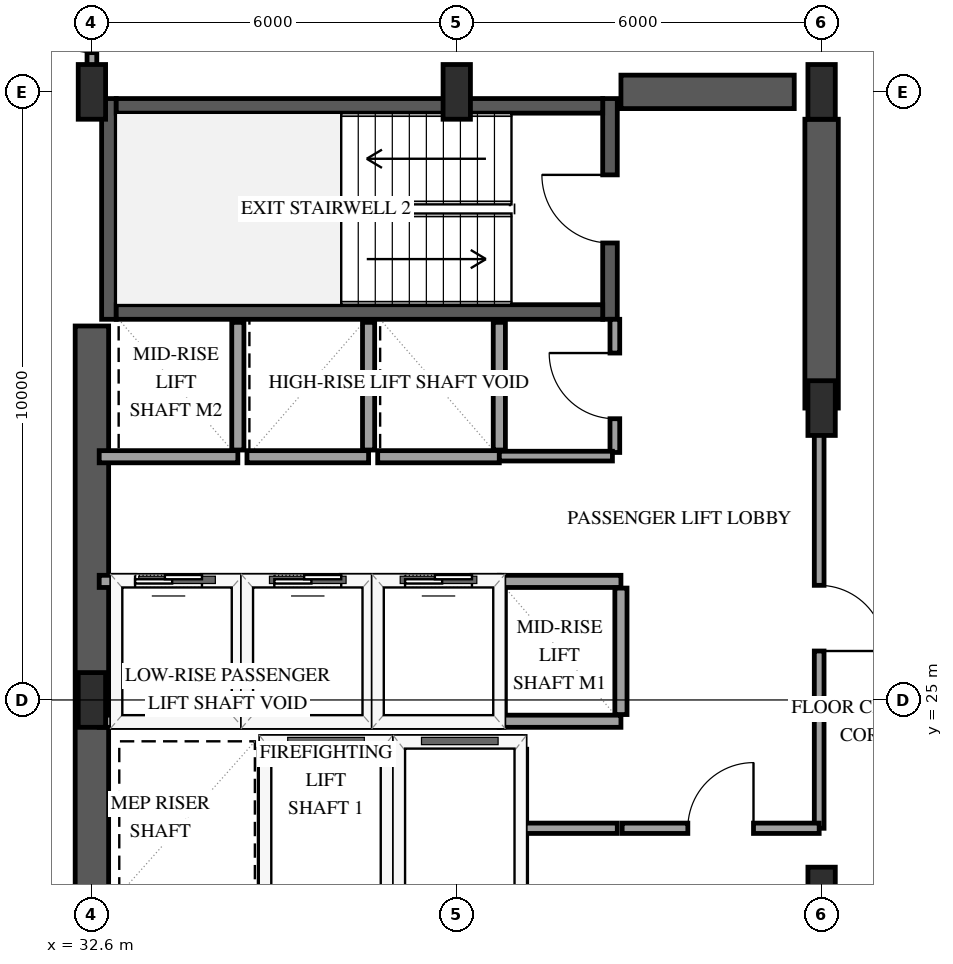
"""IFC4 building model, lengths in metres.
Left out: names, types, materials, properties, quantities, classifications, styles, units other than length and angle.
Written with IfcOpenShell. Run it as: python <this file> out.ifc"""

import sys

from ifc_helpers import new_model, si_unit, direction, frame, frame_2d, origin, origin_2d, place, context, subcontext, project, spatial, rectangle, extrude, element, fill, save


model = new_model("IFC4")
c1 = context("Model", 3, precision=1e-05, world=origin(), true_north=direction((0.0, 1.0)))
c2 = subcontext(c1, "Body", "Model", "MODEL_VIEW")
j1 = project(units=[si_unit("LENGTHUNIT", "METRE"), si_unit("PLANEANGLEUNIT", "RADIAN")], contexts=[c1])
p1 = place(None, origin())
s1 = spatial("IfcSite", under=j1, at=p1, CompositionType="ELEMENT")
p2 = place(p1, origin())
s2 = spatial("IfcBuilding", under=s1, at=p2, CompositionType="ELEMENT")
p3 = place(p2, frame((0.0, 0.0, 114.7)))
s3 = spatial("IfcBuildingStorey", under=s2, at=p3, CompositionType="ELEMENT", Elevation=114.7)
p4 = place(p3, frame((32.88, 31.26, 0.0), z_axis=(0.0, 0.0, 1.0), x_axis=(0.0, 1.0, 0.0)))
e1 = element("IfcWall", 1, at=p4, inside=s3, PredefinedType="SHEAR", context=c2, shape_type="SweptSolid", body=[
    extrude(rectangle(XDim=3.63, YDim=0.24, at=frame_2d((1.815, 0.0))), origin(), (0.0, 0.0, 1.0), 3.9),
])
p5 = place(p3, frame((41.12, 31.26, 0.0), z_axis=(0.0, 0.0, 1.0), x_axis=(0.0, 1.0, 0.0)))
e2 = element("IfcWall", 2, at=p5, inside=s3, PredefinedType="SHEAR", context=c2, shape_type="SweptSolid", body=[
    extrude(rectangle(XDim=3.63, YDim=0.24, at=frame_2d((1.815, 0.0))), origin(), (0.0, 0.0, 1.0), 3.9),
])
p6 = place(p5, frame((1.255, 0.0, 0.0)))
e3 = element("IfcOpeningElement", 3, at=p6, cuts=e2, PredefinedType="OPENING", context=c2, shape_type="SweptSolid", body=[
    extrude(rectangle(XDim=1.12, YDim=2.15, at=frame_2d((0.56, 1.075))), frame((0.0, 0.13, 0.0), z_axis=(0.0, -1.0, 0.0), x_axis=(1.0, 0.0, 0.0)), (0.0, 0.0, 1.0), 0.26),
])
for number, where, z_axis, x_axis in (
    (4, (33.0, 31.38, 0.0), (0.0, 0.0, 1.0), (1.0, 0.0, 0.0)),
    (5, (33.0, 34.77, 0.0), (0.0, 0.0, 1.0), (1.0, 0.0, 0.0)),
):
    element("IfcWall", number, at=place(p3, frame(where, z_axis=z_axis, x_axis=x_axis)), inside=s3, PredefinedType="SHEAR", context=c2, shape_type="SweptSolid", body=[
        extrude(rectangle(XDim=8.0, YDim=0.24, at=frame_2d((4.0, 0.0))), origin(), (0.0, 0.0, 1.0), 3.9),
    ])
p7 = place(p3, frame((32.6, 18.85, 0.0), z_axis=(0.0, 0.0, 1.0), x_axis=(0.0, 1.0, 0.0)))
e6 = element("IfcWall", 6, at=p7, inside=s3, PredefinedType="SHEAR", context=c2, shape_type="SweptSolid", body=[
    extrude(rectangle(XDim=12.3, YDim=0.55, at=frame_2d((6.15, 0.0))), origin(), (0.0, 0.0, 1.0), 3.9),
])
p8 = place(p3, frame((41.3, 35.0, 0.0), z_axis=(0.0, 0.0, 1.0), x_axis=(1.0, 0.0, 0.0)))
e7 = element("IfcWall", 7, at=p8, inside=s3, PredefinedType="SHEAR", context=c2, shape_type="SweptSolid", body=[
    extrude(rectangle(XDim=2.85, YDim=0.55, at=frame_2d((1.425, 0.0))), origin(), (0.0, 0.0, 1.0), 3.9),
])
p9 = place(p3, frame((44.6, 29.8, 0.0), z_axis=(0.0, 0.0, 1.0), x_axis=(0.0, 1.0, 0.0)))
e8 = element("IfcWall", 8, at=p9, inside=s3, PredefinedType="SHEAR", context=c2, shape_type="SweptSolid", body=[
    extrude(rectangle(XDim=4.75, YDim=0.55, at=frame_2d((2.375, 0.0))), origin(), (0.0, 0.0, 1.0), 3.9),
])
for number, where, z_axis, x_axis in (
    (9, (32.6, 25.0, 0.0), (0.0, 0.0, 1.0), (1.0, 0.0, 0.0)),
    (10, (32.6, 35.0, 0.0), (0.0, 0.0, 1.0), (1.0, 0.0, 0.0)),
    (11, (38.6, 35.0, 0.0), (0.0, 0.0, 1.0), (1.0, 0.0, 0.0)),
    (12, (44.6, 21.8, 0.0), (0.0, 0.0, 1.0), (1.0, 0.0, 0.0)),
    (13, (44.6, 29.8, 0.0), (0.0, 0.0, 1.0), (1.0, 0.0, 0.0)),
    (14, (44.6, 35.0, 0.0), (0.0, 0.0, 1.0), (1.0, 0.0, 0.0)),
):
    element("IfcColumn", number, at=place(p3, frame(where, z_axis=z_axis, x_axis=x_axis)), inside=s3, PredefinedType="PILASTER", context=c2, shape_type="SweptSolid", body=[
        extrude(rectangle(XDim=0.45, YDim=0.9, at=origin_2d()), origin(), (0.0, 0.0, 1.0), 3.9),
    ])
p10 = place(p3, frame((35.45, 24.3, 0.0), z_axis=(0.0, 0.0, 1.0), x_axis=(1.0, 0.0, 0.0)))
e15 = element("IfcWall", 15, at=p10, inside=s3, PredefinedType="SOLIDWALL", context=c2, shape_type="SweptSolid", body=[
    extrude(rectangle(XDim=2.0, YDim=0.2, at=frame_2d((1.0, 0.0))), origin(), (0.0, 0.0, 1.0), 3.6),
])
for number, where, z_axis, x_axis in (
    (16, (35.45, 21.81, 0.0), (0.0, 0.0, 1.0), (0.0, 1.0, 0.0)),
    (17, (37.45, 21.81, 0.0), (0.0, 0.0, 1.0), (0.0, 1.0, 0.0)),
):
    element("IfcWall", number, at=place(p3, frame(where, z_axis=z_axis, x_axis=x_axis)), inside=s3, PredefinedType="SOLIDWALL", context=c2, shape_type="SweptSolid", body=[
        extrude(rectangle(XDim=2.38, YDim=0.2, at=frame_2d((1.19, 0.0))), origin(), (0.0, 0.0, 1.0), 3.6),
    ])
p11 = place(p3, frame((37.65, 24.3, 0.0), z_axis=(0.0, 0.0, 1.0), x_axis=(1.0, 0.0, 0.0)))
e18 = element("IfcWall", 18, at=p11, inside=s3, PredefinedType="SOLIDWALL", context=c2, shape_type="SweptSolid", body=[
    extrude(rectangle(XDim=2.0, YDim=0.2, at=frame_2d((1.0, 0.0))), origin(), (0.0, 0.0, 1.0), 3.6),
])
p12 = place(p3, frame((39.65, 21.81, 0.0), z_axis=(0.0, 0.0, 1.0), x_axis=(0.0, 1.0, 0.0)))
e19 = element("IfcWall", 19, at=p12, inside=s3, PredefinedType="SOLIDWALL", context=c2, shape_type="SweptSolid", body=[
    extrude(rectangle(XDim=2.38, YDim=0.2, at=frame_2d((1.19, 0.0))), origin(), (0.0, 0.0, 1.0), 3.6),
])
p13 = place(p3, frame((32.72, 24.65, 0.0), z_axis=(0.0, 0.0, 1.0), x_axis=(1.0, 0.0, 0.0)))
e20 = element("IfcWall", 20, at=p13, inside=s3, PredefinedType="SOLIDWALL", context=c2, shape_type="SweptSolid", body=[
    extrude(rectangle(XDim=2.28, YDim=0.2, at=frame_2d((1.14, 0.0))), origin(), (0.0, 0.0, 1.0), 3.6),
])
p14 = place(p3, frame((32.72, 26.95, 0.0), z_axis=(0.0, 0.0, 1.0), x_axis=(1.0, 0.0, 0.0)))
e21 = element("IfcWall", 21, at=p14, inside=s3, PredefinedType="SOLIDWALL", context=c2, shape_type="SweptSolid", body=[
    extrude(rectangle(XDim=2.28, YDim=0.2, at=frame_2d((1.14, 0.0))), origin(), (0.0, 0.0, 1.0), 3.6),
])
p15 = place(p14, frame((0.59, 0.0, 0.0)))
e22 = element("IfcOpeningElement", 22, at=p15, cuts=e21, PredefinedType="OPENING", context=c2, shape_type="SweptSolid", body=[
    extrude(rectangle(XDim=1.1, YDim=2.15, at=frame_2d((0.55, 1.075))), frame((0.0, 0.11, 0.0), z_axis=(0.0, -1.0, 0.0), x_axis=(1.0, 0.0, 0.0)), (0.0, 0.0, 1.0), 0.22),
])
p16 = place(p3, frame((35.0, 24.76, 0.0), z_axis=(0.0, 0.0, 1.0), x_axis=(0.0, 1.0, 0.0)))
e23 = element("IfcWall", 23, at=p16, inside=s3, PredefinedType="SOLIDWALL", context=c2, shape_type="SweptSolid", body=[
    extrude(rectangle(XDim=2.08, YDim=0.2, at=frame_2d((1.04, 0.0))), origin(), (0.0, 0.0, 1.0), 3.6),
])
p17 = place(p3, frame((35.15, 24.65, 0.0), z_axis=(0.0, 0.0, 1.0), x_axis=(1.0, 0.0, 0.0)))
e24 = element("IfcWall", 24, at=p17, inside=s3, PredefinedType="SOLIDWALL", context=c2, shape_type="SweptSolid", body=[
    extrude(rectangle(XDim=2.0, YDim=0.2, at=frame_2d((1.0, 0.0))), origin(), (0.0, 0.0, 1.0), 3.6),
])
p18 = place(p3, frame((35.15, 26.95, 0.0), z_axis=(0.0, 0.0, 1.0), x_axis=(1.0, 0.0, 0.0)))
e25 = element("IfcWall", 25, at=p18, inside=s3, PredefinedType="SOLIDWALL", context=c2, shape_type="SweptSolid", body=[
    extrude(rectangle(XDim=2.0, YDim=0.2, at=frame_2d((1.0, 0.0))), origin(), (0.0, 0.0, 1.0), 3.6),
])
p19 = place(p18, frame((0.45, 0.0, 0.0)))
e26 = element("IfcOpeningElement", 26, at=p19, cuts=e25, PredefinedType="OPENING", context=c2, shape_type="SweptSolid", body=[
    extrude(rectangle(XDim=1.1, YDim=2.15, at=frame_2d((0.55, 1.075))), frame((0.0, 0.11, 0.0), z_axis=(0.0, -1.0, 0.0), x_axis=(1.0, 0.0, 0.0)), (0.0, 0.0, 1.0), 0.22),
])
p20 = place(p3, frame((37.15, 24.76, 0.0), z_axis=(0.0, 0.0, 1.0), x_axis=(0.0, 1.0, 0.0)))
e27 = element("IfcWall", 27, at=p20, inside=s3, PredefinedType="SOLIDWALL", context=c2, shape_type="SweptSolid", body=[
    extrude(rectangle(XDim=2.08, YDim=0.2, at=frame_2d((1.04, 0.0))), origin(), (0.0, 0.0, 1.0), 3.6),
])
p21 = place(p3, frame((37.3, 24.65, 0.0), z_axis=(0.0, 0.0, 1.0), x_axis=(1.0, 0.0, 0.0)))
e28 = element("IfcWall", 28, at=p21, inside=s3, PredefinedType="SOLIDWALL", context=c2, shape_type="SweptSolid", body=[
    extrude(rectangle(XDim=2.0, YDim=0.2, at=frame_2d((1.0, 0.0))), origin(), (0.0, 0.0, 1.0), 3.6),
])
p22 = place(p3, frame((37.3, 26.95, 0.0), z_axis=(0.0, 0.0, 1.0), x_axis=(1.0, 0.0, 0.0)))
e29 = element("IfcWall", 29, at=p22, inside=s3, PredefinedType="SOLIDWALL", context=c2, shape_type="SweptSolid", body=[
    extrude(rectangle(XDim=2.0, YDim=0.2, at=frame_2d((1.0, 0.0))), origin(), (0.0, 0.0, 1.0), 3.6),
])
p23 = place(p22, frame((0.45, 0.0, 0.0)))
e30 = element("IfcOpeningElement", 30, at=p23, cuts=e29, PredefinedType="OPENING", context=c2, shape_type="SweptSolid", body=[
    extrude(rectangle(XDim=1.1, YDim=2.15, at=frame_2d((0.55, 1.075))), frame((0.0, 0.11, 0.0), z_axis=(0.0, -1.0, 0.0), x_axis=(1.0, 0.0, 0.0)), (0.0, 0.0, 1.0), 0.22),
])
p24 = place(p3, frame((39.3, 24.76, 0.0), z_axis=(0.0, 0.0, 1.0), x_axis=(0.0, 1.0, 0.0)))
e31 = element("IfcWall", 31, at=p24, inside=s3, PredefinedType="SOLIDWALL", context=c2, shape_type="SweptSolid", body=[
    extrude(rectangle(XDim=2.08, YDim=0.2, at=frame_2d((1.04, 0.0))), origin(), (0.0, 0.0, 1.0), 3.6),
])
for number, where, z_axis, x_axis in (
    (32, (39.3, 24.65, 0.0), (0.0, 0.0, 1.0), (1.0, 0.0, 0.0)),
    (33, (39.3, 26.95, 0.0), (0.0, 0.0, 1.0), (1.0, 0.0, 0.0)),
):
    element("IfcWall", number, at=place(p3, frame(where, z_axis=z_axis, x_axis=x_axis)), inside=s3, PredefinedType="SOLIDWALL", context=c2, shape_type="SweptSolid", body=[
        extrude(rectangle(XDim=2.0, YDim=0.2, at=frame_2d((1.0, 0.0))), origin(), (0.0, 0.0, 1.0), 3.6),
    ])
p25 = place(p3, frame((41.3, 24.76, 0.0), z_axis=(0.0, 0.0, 1.0), x_axis=(0.0, 1.0, 0.0)))
e34 = element("IfcWall", 34, at=p25, inside=s3, PredefinedType="SOLIDWALL", context=c2, shape_type="SweptSolid", body=[
    extrude(rectangle(XDim=2.08, YDim=0.2, at=frame_2d((1.04, 0.0))), origin(), (0.0, 0.0, 1.0), 3.6),
])
p26 = place(p3, frame((32.72, 29.0, 0.0), z_axis=(0.0, 0.0, 1.0), x_axis=(1.0, 0.0, 0.0)))
e35 = element("IfcWall", 35, at=p26, inside=s3, PredefinedType="SOLIDWALL", context=c2, shape_type="SweptSolid", body=[
    extrude(rectangle(XDim=2.28, YDim=0.2, at=frame_2d((1.14, 0.0))), origin(), (0.0, 0.0, 1.0), 3.6),
])
p27 = place(p3, frame((35.0, 29.11, 0.0), z_axis=(0.0, 0.0, 1.0), x_axis=(0.0, 1.0, 0.0)))
e36 = element("IfcWall", 36, at=p27, inside=s3, PredefinedType="SOLIDWALL", context=c2, shape_type="SweptSolid", body=[
    extrude(rectangle(XDim=2.1, YDim=0.2, at=frame_2d((1.05, 0.0))), origin(), (0.0, 0.0, 1.0), 3.6),
])
p28 = place(p3, frame((35.15, 29.0, 0.0), z_axis=(0.0, 0.0, 1.0), x_axis=(1.0, 0.0, 0.0)))
e37 = element("IfcWall", 37, at=p28, inside=s3, PredefinedType="SOLIDWALL", context=c2, shape_type="SweptSolid", body=[
    extrude(rectangle(XDim=2.0, YDim=0.2, at=frame_2d((1.0, 0.0))), origin(), (0.0, 0.0, 1.0), 3.6),
])
p29 = place(p3, frame((37.15, 29.11, 0.0), z_axis=(0.0, 0.0, 1.0), x_axis=(0.0, 1.0, 0.0)))
e38 = element("IfcWall", 38, at=p29, inside=s3, PredefinedType="SOLIDWALL", context=c2, shape_type="SweptSolid", body=[
    extrude(rectangle(XDim=2.1, YDim=0.2, at=frame_2d((1.05, 0.0))), origin(), (0.0, 0.0, 1.0), 3.6),
])
p30 = place(p3, frame((37.3, 29.0, 0.0), z_axis=(0.0, 0.0, 1.0), x_axis=(1.0, 0.0, 0.0)))
e39 = element("IfcWall", 39, at=p30, inside=s3, PredefinedType="SOLIDWALL", context=c2, shape_type="SweptSolid", body=[
    extrude(rectangle(XDim=2.0, YDim=0.2, at=frame_2d((1.0, 0.0))), origin(), (0.0, 0.0, 1.0), 3.6),
])
p31 = place(p3, frame((39.3, 29.11, 0.0), z_axis=(0.0, 0.0, 1.0), x_axis=(0.0, 1.0, 0.0)))
e40 = element("IfcWall", 40, at=p31, inside=s3, PredefinedType="SOLIDWALL", context=c2, shape_type="SweptSolid", body=[
    extrude(rectangle(XDim=2.1, YDim=0.2, at=frame_2d((1.05, 0.0))), origin(), (0.0, 0.0, 1.0), 3.6),
])
p32 = place(p3, frame((44.56, 29.8, 0.0), z_axis=(0.0, 0.0, 1.0), x_axis=(0.0, -1.0, 0.0)))
e41 = element("IfcWall", 41, at=p32, inside=s3, PredefinedType="PARTITIONING", context=c2, shape_type="SweptSolid", body=[
    extrude(rectangle(XDim=6.91, YDim=0.16, at=frame_2d((3.455, 0.0))), origin(), (0.0, 0.0, 1.0), 2.64),
])
p33 = place(p32, frame((2.915, 0.0, 0.0)))
e42 = element("IfcOpeningElement", 42, at=p33, cuts=e41, PredefinedType="OPENING", context=c2, shape_type="SweptSolid", body=[
    extrude(rectangle(XDim=1.08, YDim=2.15, at=frame_2d((0.54, 1.075))), frame((0.0, 0.09, 0.0), z_axis=(0.0, -1.0, 0.0), x_axis=(1.0, 0.0, 0.0)), (0.0, 0.0, 1.0), 0.18),
])
p34 = place(p3, frame((41.32, 22.89, 0.0), z_axis=(0.0, 0.0, 1.0), x_axis=(1.0, 0.0, 0.0)))
e43 = element("IfcWall", 43, at=p34, inside=s3, PredefinedType="PARTITIONING", context=c2, shape_type="SweptSolid", body=[
    extrude(rectangle(XDim=3.24, YDim=0.17, at=frame_2d((1.62, 0.0))), origin(), (0.0, 0.0, 1.0), 3.6),
])
p35 = place(p34, frame((1.08, 0.0, 0.0)))
e44 = element("IfcOpeningElement", 44, at=p35, cuts=e43, PredefinedType="OPENING", context=c2, shape_type="SweptSolid", body=[
    extrude(rectangle(XDim=1.08, YDim=2.15, at=frame_2d((0.54, 1.075))), frame((0.0, 0.095, 0.0), z_axis=(0.0, -1.0, 0.0), x_axis=(1.0, 0.0, 0.0)), (0.0, 0.0, 1.0), 0.19),
])
p36 = place(p3, frame((41.2, 29.07, 0.0), z_axis=(0.0, 0.0, 1.0), x_axis=(0.0, 1.0, 0.0)))
e45 = element("IfcWall", 45, at=p36, inside=s3, PredefinedType="PARTITIONING", context=c2, shape_type="SweptSolid", body=[
    extrude(rectangle(XDim=2.19, YDim=0.16, at=frame_2d((1.095, 0.0))), origin(), (0.0, 0.0, 1.0), 3.6),
])
p37 = place(p36, frame((0.555, 0.0, 0.0)))
e46 = element("IfcOpeningElement", 46, at=p37, cuts=e45, PredefinedType="OPENING", context=c2, shape_type="SweptSolid", body=[
    extrude(rectangle(XDim=1.08, YDim=2.15, at=frame_2d((0.54, 1.075))), frame((0.0, 0.09, 0.0), z_axis=(0.0, -1.0, 0.0), x_axis=(1.0, 0.0, 0.0)), (0.0, 0.0, 1.0), 0.18),
])
p38 = place(p3, frame((32.6, 35.07, 0.0), z_axis=(0.0, 0.0, 1.0), x_axis=(0.0, 1.0, 0.0)))
e47 = element("IfcWall", 47, at=p38, inside=s3, PredefinedType="PARTITIONING", context=c2, shape_type="SweptSolid", body=[
    extrude(rectangle(XDim=1.91, YDim=0.16, at=frame_2d((0.955, 0.0))), origin(), (0.0, 0.0, 1.0), 3.6),
])
p39 = place(p38, frame((0.575, 0.0, 0.0)))
e48 = element("IfcOpeningElement", 48, at=p39, cuts=e47, PredefinedType="OPENING", context=c2, shape_type="SweptSolid", body=[
    extrude(rectangle(XDim=0.95, YDim=2.15, at=frame_2d((0.475, 1.075))), frame((0.0, 0.09, 0.0), z_axis=(0.0, -1.0, 0.0), x_axis=(1.0, 0.0, 0.0)), (0.0, 0.0, 1.0), 0.18),
])
p40 = place(p3, frame((39.3, 29.01, 0.0), z_axis=(0.0, 0.0, 1.0), x_axis=(1.0, 0.0, 0.0)))
e49 = element("IfcWall", 49, at=p40, inside=s3, PredefinedType="PARTITIONING", context=c2, shape_type="SweptSolid", body=[
    extrude(rectangle(XDim=1.86, YDim=0.16, at=frame_2d((0.93, 0.0))), origin(), (0.0, 0.0, 1.0), 3.6),
])
p41 = place(p3, frame((39.72, 22.89, 0.0), z_axis=(0.0, 0.0, 1.0), x_axis=(1.0, 0.0, 0.0)))
e50 = element("IfcWall", 50, at=p41, inside=s3, PredefinedType="PARTITIONING", context=c2, shape_type="SweptSolid", body=[
    extrude(rectangle(XDim=1.52, YDim=0.17, at=frame_2d((0.76, 0.0))), origin(), (0.0, 0.0, 1.0), 3.6),
])
p42 = place(p15, origin())
e51 = element("IfcDoor", 51, at=p42, inside=s3, OperationType="SLIDING_TO_LEFT", PredefinedType="DOOR", context=c2, shape_type="SweptSolid", body=[
    extrude(rectangle(XDim=1.1, YDim=2.15, at=frame_2d((0.55, 1.075))), frame((0.0, 0.025, 0.0), z_axis=(0.0, -1.0, 0.0), x_axis=(1.0, 0.0, 0.0)), (0.0, 0.0, 1.0), 0.05),
])
fill(e22, e51)
p43 = place(p19, origin())
e52 = element("IfcDoor", 52, at=p43, inside=s3, OperationType="SLIDING_TO_LEFT", PredefinedType="DOOR", context=c2, shape_type="SweptSolid", body=[
    extrude(rectangle(XDim=1.1, YDim=2.15, at=frame_2d((0.55, 1.075))), frame((0.0, 0.025, 0.0), z_axis=(0.0, -1.0, 0.0), x_axis=(1.0, 0.0, 0.0)), (0.0, 0.0, 1.0), 0.05),
])
fill(e26, e52)
p44 = place(p23, origin())
e53 = element("IfcDoor", 53, at=p44, inside=s3, OperationType="SLIDING_TO_LEFT", PredefinedType="DOOR", context=c2, shape_type="SweptSolid", body=[
    extrude(rectangle(XDim=1.1, YDim=2.15, at=frame_2d((0.55, 1.075))), frame((0.0, 0.025, 0.0), z_axis=(0.0, -1.0, 0.0), x_axis=(1.0, 0.0, 0.0)), (0.0, 0.0, 1.0), 0.05),
])
fill(e30, e53)
p45 = place(p6, origin())
e54 = element("IfcDoor", 54, at=p45, inside=s3, OperationType="SINGLE_SWING_RIGHT", PredefinedType="DOOR", context=c2, shape_type="SweptSolid", body=[
    extrude(rectangle(XDim=1.12, YDim=2.15, at=frame_2d((0.56, 1.075))), frame((0.0, 0.025, 0.0), z_axis=(0.0, -1.0, 0.0), x_axis=(1.0, 0.0, 0.0)), (0.0, 0.0, 1.0), 0.05),
])
fill(e3, e54)
p46 = place(p33, origin())
e55 = element("IfcDoor", 55, at=p46, inside=s3, OperationType="SINGLE_SWING_RIGHT", PredefinedType="DOOR", context=c2, shape_type="SweptSolid", body=[
    extrude(rectangle(XDim=1.08, YDim=2.15, at=frame_2d((0.54, 1.075))), frame((0.0, 0.025, 0.0), z_axis=(0.0, -1.0, 0.0), x_axis=(1.0, 0.0, 0.0)), (0.0, 0.0, 1.0), 0.05),
])
fill(e42, e55)
p47 = place(p35, origin())
e56 = element("IfcDoor", 56, at=p47, inside=s3, OperationType="SINGLE_SWING_RIGHT", PredefinedType="DOOR", context=c2, shape_type="SweptSolid", body=[
    extrude(rectangle(XDim=1.08, YDim=2.15, at=frame_2d((0.54, 1.075))), frame((0.0, 0.025, 0.0), z_axis=(0.0, -1.0, 0.0), x_axis=(1.0, 0.0, 0.0)), (0.0, 0.0, 1.0), 0.05),
])
fill(e44, e56)
p48 = place(p37, origin())
e57 = element("IfcDoor", 57, at=p48, inside=s3, OperationType="SINGLE_SWING_RIGHT", PredefinedType="DOOR", context=c2, shape_type="SweptSolid", body=[
    extrude(rectangle(XDim=1.08, YDim=2.15, at=frame_2d((0.54, 1.075))), frame((0.0, 0.025, 0.0), z_axis=(0.0, -1.0, 0.0), x_axis=(1.0, 0.0, 0.0)), (0.0, 0.0, 1.0), 0.05),
])
fill(e46, e57)
p49 = place(p39, origin())
e58 = element("IfcDoor", 58, at=p49, inside=s3, OperationType="SINGLE_SWING_RIGHT", PredefinedType="DOOR", context=c2, shape_type="SweptSolid", body=[
    extrude(rectangle(XDim=0.95, YDim=2.15, at=frame_2d((0.475, 1.075))), frame((0.0, 0.025, 0.0), z_axis=(0.0, -1.0, 0.0), x_axis=(1.0, 0.0, 0.0)), (0.0, 0.0, 1.0), 0.05),
])
fill(e48, e58)
save(model, sys.argv[1])
